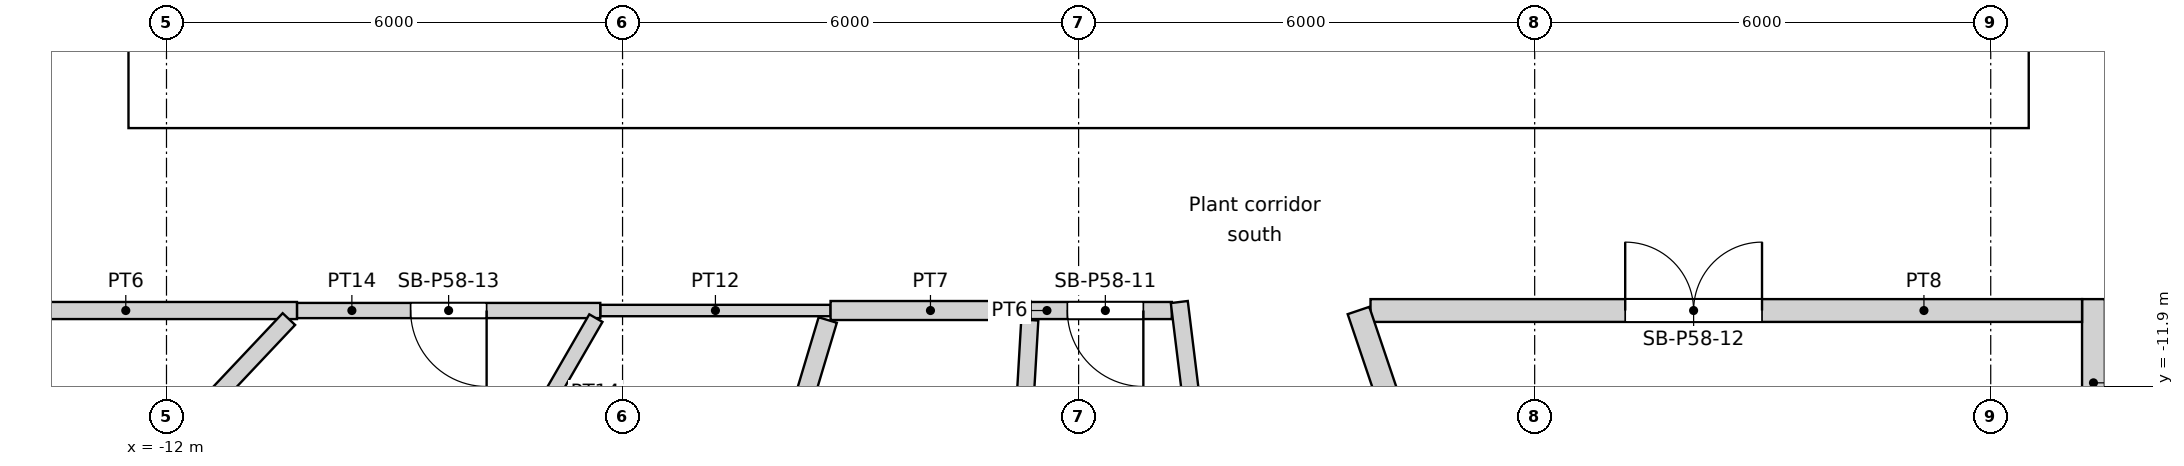
"""IFC4 building model, lengths in metres.
Left out: names, types, materials, properties, quantities, classifications, styles, units other than length and angle.
Written with IfcOpenShell. Run it as: python <this file> out.ifc"""

import sys

from ifc_helpers import new_model, si_unit, direction, frame, frame_2d, origin, place, context, subcontext, project, spatial, rectangle, extrude, element, fill, save


model = new_model("IFC4")
c1 = context("Model", 3, precision=1e-05, world=origin(), true_north=direction((0.0, 1.0)))
c2 = subcontext(c1, "Body", "Model", "MODEL_VIEW")
j1 = project(units=[si_unit("LENGTHUNIT", "METRE"), si_unit("PLANEANGLEUNIT", "RADIAN")], contexts=[c1])
p1 = place(None, origin())
s1 = spatial("IfcSite", under=j1, at=p1, CompositionType="ELEMENT")
p2 = place(p1, origin())
s2 = spatial("IfcBuilding", under=s1, at=p2, CompositionType="ELEMENT")
p3 = place(p2, frame((0.0, 0.0, 225.0)))
s3 = spatial("IfcBuildingStorey", under=s2, at=p3, CompositionType="ELEMENT", Elevation=225.0)
p4 = place(p3, frame((-12.5, -8.05, 0.0), z_axis=(0.0, 0.0, 1.0), x_axis=(1.0, 0.0, 0.0)))
e1 = element("IfcWall", 1, at=p4, inside=s3, PredefinedType="SOLIDWALL", context=c2, shape_type="SweptSolid", body=[
    extrude(rectangle(XDim=25.0, YDim=0.9, at=frame_2d((12.5, 0.0))), origin(), (0.0, 0.0, 1.0), 5.65),
])
p5 = place(p4, frame((13.4, 0.0, 0.0)))
e2 = element("IfcOpeningElement", 2, at=p5, cuts=e1, PredefinedType="OPENING", context=c2, shape_type="SweptSolid", body=[
    extrude(rectangle(XDim=1.0, YDim=2.1, at=frame_2d((0.5, 1.05))), frame((0.0, 0.45, 0.0), z_axis=(0.0, -1.0, 0.0), x_axis=(1.0, 0.0, 0.0)), (0.0, 0.0, 1.0), 0.9),
])
p6 = place(p4, frame((8.3, 0.0, 0.0)))
e3 = element("IfcOpeningElement", 3, at=p6, cuts=e1, PredefinedType="OPENING", context=c2, shape_type="SweptSolid", body=[
    extrude(rectangle(XDim=1.8, YDim=2.1, at=frame_2d((0.9, 1.05))), frame((0.0, 0.45, 0.0), z_axis=(0.0, -1.0, 0.0), x_axis=(1.0, 0.0, 0.0)), (0.0, 0.0, 1.0), 0.9),
])
p7 = place(p4, frame((14.9, 0.0, 0.0)))
e4 = element("IfcOpeningElement", 4, at=p7, cuts=e1, PredefinedType="OPENING", context=c2, shape_type="SweptSolid", body=[
    extrude(rectangle(XDim=1.8, YDim=2.1, at=frame_2d((0.9, 1.05))), frame((0.0, 0.45, 0.0), z_axis=(0.0, -1.0, 0.0), x_axis=(1.0, 0.0, 0.0)), (0.0, 0.0, 1.0), 0.9),
])
p8 = place(p3, frame((-12.05, -7.6, 0.0), z_axis=(0.0, 0.0, 1.0), x_axis=(0.0, 1.0, 0.0)))
e5 = element("IfcWall", 5, at=p8, inside=s3, PredefinedType="SOLIDWALL", context=c2, shape_type="SweptSolid", body=[
    extrude(rectangle(XDim=15.2, YDim=0.9, at=frame_2d((7.6, 0.0))), origin(), (0.0, 0.0, 1.0), 5.65),
])
p9 = place(p8, frame((7.1, 0.0, 0.0)))
e6 = element("IfcOpeningElement", 6, at=p9, cuts=e5, PredefinedType="OPENING", context=c2, shape_type="SweptSolid", body=[
    extrude(rectangle(XDim=1.0, YDim=2.1, at=frame_2d((0.5, 1.05))), frame((0.0, 0.45, 0.0), z_axis=(0.0, -1.0, 0.0), x_axis=(1.0, 0.0, 0.0)), (0.0, 0.0, 1.0), 0.9),
])
p10 = place(p3, frame((12.05, -7.6, 0.0), z_axis=(0.0, 0.0, 1.0), x_axis=(0.0, 1.0, 0.0)))
e7 = element("IfcWall", 7, at=p10, inside=s3, PredefinedType="SOLIDWALL", context=c2, shape_type="SweptSolid", body=[
    extrude(rectangle(XDim=15.2, YDim=0.9, at=frame_2d((7.6, 0.0))), origin(), (0.0, 0.0, 1.0), 5.65),
])
p11 = place(p10, frame((5.1, 0.0, 0.0)))
e8 = element("IfcOpeningElement", 8, at=p11, cuts=e7, PredefinedType="OPENING", context=c2, shape_type="SweptSolid", body=[
    extrude(rectangle(XDim=1.0, YDim=2.1, at=frame_2d((0.5, 1.05))), frame((0.0, 0.45, 0.0), z_axis=(0.0, -1.0, 0.0), x_axis=(1.0, 0.0, 0.0)), (0.0, 0.0, 1.0), 0.9),
])
for number, where, z_axis, x_axis in (
    (9, (0.55, -7.6, 0.0), (0.0, 0.0, 1.0), (0.0, 1.0, 0.0)),
    (10, (2.25, -7.6, 0.0), (0.0, 0.0, 1.0), (0.0, 1.0, 0.0)),
):
    element("IfcWall", number, at=place(p3, frame(where, z_axis=z_axis, x_axis=x_axis)), inside=s3, PredefinedType="SOLIDWALL", context=c2, shape_type="SweptSolid", body=[
        extrude(rectangle(XDim=4.35, YDim=0.3, at=frame_2d((2.175, 0.0))), origin(), (0.0, 0.0, 1.0), 5.65),
    ])
p12 = place(p3, frame((-9.05, -7.15, 0.0), z_axis=(0.0, 0.0, 1.0), x_axis=(1.0, 0.0, 0.0)))
e11 = element("IfcWall", 11, at=p12, inside=s3, PredefinedType="SOLIDWALL", context=c2, shape_type="SweptSolid", body=[
    extrude(rectangle(XDim=4.85, YDim=0.9, at=frame_2d((2.425, 0.0))), origin(), (0.0, 0.0, 1.0), 5.65),
])
p13 = place(p3, frame((-2.4, -7.15, 0.0), z_axis=(0.0, 0.0, 1.0), x_axis=(1.0, 0.0, 0.0)))
e12 = element("IfcWall", 12, at=p13, inside=s3, PredefinedType="SOLIDWALL", context=c2, shape_type="SweptSolid", body=[
    extrude(rectangle(XDim=2.8, YDim=0.9, at=frame_2d((1.4, 0.0))), origin(), (0.0, 0.0, 1.0), 5.65),
])
p14 = place(p3, frame((4.2, -7.15, 0.0), z_axis=(0.0, 0.0, 1.0), x_axis=(1.0, 0.0, 0.0)))
e13 = element("IfcWall", 13, at=p14, inside=s3, PredefinedType="SOLIDWALL", context=c2, shape_type="SweptSolid", body=[
    extrude(rectangle(XDim=4.85, YDim=0.9, at=frame_2d((2.425, 0.0))), origin(), (0.0, 0.0, 1.0), 5.65),
])
p15 = place(p3, frame((-17.497, -18.546, 0.0), z_axis=(0.0, 0.0, 1.0), x_axis=(0.686253135809, 0.727362793654, 0.0)))
e14 = element("IfcWall", 14, at=p15, inside=s3, PredefinedType="PARTITIONING", context=c2, shape_type="SweptSolid", body=[
    extrude(rectangle(XDim=10.357, YDim=0.225, at=frame_2d((5.179, 0.0))), origin(), (0.0, 0.0, 1.0), 2.7),
])
p16 = place(p3, frame((-14.788, -10.9, 0.0), z_axis=(0.0, 0.0, 1.0), x_axis=(1.0, 0.0, 0.0)))
e15 = element("IfcWall", 15, at=p16, inside=s3, PredefinedType="PARTITIONING", context=c2, shape_type="SweptSolid", body=[
    extrude(rectangle(XDim=4.504, YDim=0.225, at=frame_2d((2.252, 0.0))), origin(), (0.0, 0.0, 1.0), 5.2),
])
p17 = place(p3, frame((-10.284, -10.9, 0.0), z_axis=(0.0, 0.0, 1.0), x_axis=(1.0, 0.0, 0.0)))
e16 = element("IfcWall", 16, at=p17, inside=s3, PredefinedType="PARTITIONING", context=c2, shape_type="SweptSolid", body=[
    extrude(rectangle(XDim=3.99, YDim=0.2, at=frame_2d((1.995, 0.0))), origin(), (0.0, 0.0, 1.0), 5.2),
])
p18 = place(p17, frame((1.495, 0.0, 0.0)))
e17 = element("IfcOpeningElement", 17, at=p18, cuts=e16, PredefinedType="OPENING", context=c2, shape_type="SweptSolid", body=[
    extrude(rectangle(XDim=1.0, YDim=2.1, at=frame_2d((0.5, 1.05))), frame((0.0, 0.1, 0.0), z_axis=(0.0, -1.0, 0.0), x_axis=(1.0, 0.0, 0.0)), (0.0, 0.0, 1.0), 0.2),
])
p19 = place(p3, frame((-6.351, -11.0, 0.0), z_axis=(0.0, 0.0, 1.0), x_axis=(-0.500013765421, -0.866017456169, 0.0)))
e18 = element("IfcWall", 18, at=p19, inside=s3, PredefinedType="PARTITIONING", context=c2, shape_type="SweptSolid", body=[
    extrude(rectangle(XDim=5.658, YDim=0.2, at=frame_2d((2.829, 0.0))), origin(), (0.0, 0.0, 1.0), 5.2),
])
p20 = place(p19, frame((2.334, 0.0, 0.0)))
e19 = element("IfcOpeningElement", 19, at=p20, cuts=e18, PredefinedType="OPENING", context=c2, shape_type="SweptSolid", body=[
    extrude(rectangle(XDim=1.0, YDim=2.1, at=frame_2d((0.5, 1.05))), frame((0.0, 0.1, 0.0), z_axis=(0.0, -1.0, 0.0), x_axis=(1.0, 0.0, 0.0)), (0.0, 0.0, 1.0), 0.2),
])
p21 = place(p3, frame((-6.293, -10.9, 0.0), z_axis=(0.0, 0.0, 1.0), x_axis=(1.0, 0.0, 0.0)))
e20 = element("IfcWall", 20, at=p21, inside=s3, PredefinedType="PARTITIONING", context=c2, shape_type="SweptSolid", body=[
    extrude(rectangle(XDim=3.03, YDim=0.15, at=frame_2d((1.515, 0.0))), origin(), (0.0, 0.0, 1.0), 5.2),
])
p22 = place(p3, frame((-5.266, -17.589, 0.0), z_axis=(0.0, 0.0, 1.0), x_axis=(0.286831354486, 0.957981092759, 0.0)))
e21 = element("IfcWall", 21, at=p22, inside=s3, PredefinedType="PARTITIONING", context=c2, shape_type="SweptSolid", body=[
    extrude(rectangle(XDim=6.852, YDim=0.25, at=frame_2d((3.426, 0.0))), origin(), (0.0, 0.0, 1.0), 5.2),
])
p23 = place(p3, frame((-3.263, -10.9, 0.0), z_axis=(0.0, 0.0, 1.0), x_axis=(1.0, 0.0, 0.0)))
e22 = element("IfcWall", 22, at=p23, inside=s3, PredefinedType="PARTITIONING", context=c2, shape_type="SweptSolid", body=[
    extrude(rectangle(XDim=2.628, YDim=0.25, at=frame_2d((1.314, 0.0))), origin(), (0.0, 0.0, 1.0), 5.2),
])
p24 = place(p3, frame((-1.482, -25.454, 0.0), z_axis=(0.0, 0.0, 1.0), x_axis=(0.058139787004, 0.998308451916, 0.0)))
e23 = element("IfcWall", 23, at=p24, inside=s3, PredefinedType="PARTITIONING", context=c2, shape_type="SweptSolid", body=[
    extrude(rectangle(XDim=14.454, YDim=0.225, at=frame_2d((7.227, 0.0))), origin(), (0.0, 0.0, 1.0), 2.7),
])
p25 = place(p3, frame((-0.635, -10.9, 0.0), z_axis=(0.0, 0.0, 1.0), x_axis=(1.0, 0.0, 0.0)))
e24 = element("IfcWall", 24, at=p25, inside=s3, PredefinedType="PARTITIONING", context=c2, shape_type="SweptSolid", body=[
    extrude(rectangle(XDim=1.861, YDim=0.225, at=frame_2d((0.93, 0.0))), origin(), (0.0, 0.0, 1.0), 5.2),
])
p26 = place(p25, frame((0.487, 0.0, 0.0)))
e25 = element("IfcOpeningElement", 25, at=p26, cuts=e24, PredefinedType="OPENING", context=c2, shape_type="SweptSolid", body=[
    extrude(rectangle(XDim=1.0, YDim=2.1, at=frame_2d((0.5, 1.05))), frame((0.0, 0.113, 0.0), z_axis=(0.0, -1.0, 0.0), x_axis=(1.0, 0.0, 0.0)), (0.0, 0.0, 1.0), 0.225),
])
p27 = place(p3, frame((2.662, -21.679, 0.0), z_axis=(0.0, 0.0, 1.0), x_axis=(-0.121884764191, 0.992544258085, 0.0)))
e26 = element("IfcWall", 26, at=p27, inside=s3, PredefinedType="PARTITIONING", context=c2, shape_type="SweptSolid", body=[
    extrude(rectangle(XDim=10.973, YDim=0.225, at=frame_2d((5.486, 0.0))), origin(), (0.0, 0.0, 1.0), 5.2),
])
p28 = place(p3, frame((3.84, -10.9, 0.0), z_axis=(0.0, 0.0, 1.0), x_axis=(1.0, 0.0, 0.0)))
e27 = element("IfcWall", 27, at=p28, inside=s3, PredefinedType="PARTITIONING", context=c2, shape_type="SweptSolid", body=[
    extrude(rectangle(XDim=9.361, YDim=0.3, at=frame_2d((4.681, 0.0))), origin(), (0.0, 0.0, 1.0), 5.2),
])
p29 = place(p28, frame((3.351, 0.0, 0.0)))
e28 = element("IfcOpeningElement", 28, at=p29, cuts=e27, PredefinedType="OPENING", context=c2, shape_type="SweptSolid", body=[
    extrude(rectangle(XDim=1.8, YDim=2.4, at=frame_2d((0.9, 1.2))), frame((0.0, 0.15, 0.0), z_axis=(0.0, -1.0, 0.0), x_axis=(1.0, 0.0, 0.0)), (0.0, 0.0, 1.0), 0.3),
])
p30 = place(p3, frame((7.076, -20.947, 0.0), z_axis=(0.0, 0.0, 1.0), x_axis=(-0.320044465118, 0.947402522874, 0.0)))
e29 = element("IfcWall", 29, at=p30, inside=s3, PredefinedType="PARTITIONING", context=c2, shape_type="SweptSolid", body=[
    extrude(rectangle(XDim=10.605, YDim=0.3, at=frame_2d((5.302, 0.0))), origin(), (0.0, 0.0, 1.0), 5.2),
])
p31 = place(p3, frame((13.352, -10.75, 0.0), z_axis=(0.0, 0.0, 1.0), x_axis=(0.0, -1.0, 0.0)))
e30 = element("IfcWall", 30, at=p31, inside=s3, PredefinedType="PARTITIONING", context=c2, shape_type="SweptSolid", body=[
    extrude(rectangle(XDim=2.203, YDim=0.3, at=frame_2d((1.102, 0.0))), origin(), (0.0, 0.0, 1.0), 5.2),
])
p32 = place(p5, origin())
e31 = element("IfcDoor", 31, at=p32, inside=s3, OperationType="SINGLE_SWING_LEFT", PredefinedType="DOOR", context=c2, shape_type="SweptSolid", body=[
    extrude(rectangle(XDim=1.0, YDim=2.1, at=frame_2d((0.5, 1.05))), frame((0.0, 0.025, 0.0), z_axis=(0.0, -1.0, 0.0), x_axis=(1.0, 0.0, 0.0)), (0.0, 0.0, 1.0), 0.05),
])
fill(e2, e31)
p33 = place(p6, origin())
e32 = element("IfcDoor", 32, at=p33, inside=s3, OperationType="DOUBLE_DOOR_SINGLE_SWING", PredefinedType="DOOR", context=c2, shape_type="SweptSolid", body=[
    extrude(rectangle(XDim=1.8, YDim=2.1, at=frame_2d((0.9, 1.05))), frame((0.0, 0.025, 0.0), z_axis=(0.0, -1.0, 0.0), x_axis=(1.0, 0.0, 0.0)), (0.0, 0.0, 1.0), 0.05),
])
fill(e3, e32)
p34 = place(p7, origin())
e33 = element("IfcDoor", 33, at=p34, inside=s3, OperationType="DOUBLE_DOOR_SINGLE_SWING", PredefinedType="DOOR", context=c2, shape_type="SweptSolid", body=[
    extrude(rectangle(XDim=1.8, YDim=2.1, at=frame_2d((0.9, 1.05))), frame((0.0, 0.025, 0.0), z_axis=(0.0, -1.0, 0.0), x_axis=(1.0, 0.0, 0.0)), (0.0, 0.0, 1.0), 0.05),
])
fill(e4, e33)
p35 = place(p26, origin())
e34 = element("IfcDoor", 34, at=p35, inside=s3, OperationType="SINGLE_SWING_LEFT", PredefinedType="DOOR", context=c2, shape_type="SweptSolid", body=[
    extrude(rectangle(XDim=1.0, YDim=2.1, at=frame_2d((0.5, 1.05))), frame((0.0, 0.025, 0.0), z_axis=(0.0, -1.0, 0.0), x_axis=(1.0, 0.0, 0.0)), (0.0, 0.0, 1.0), 0.05),
])
fill(e25, e34)
p36 = place(p29, origin())
e35 = element("IfcDoor", 35, at=p36, inside=s3, OperationType="DOUBLE_DOOR_SINGLE_SWING", PredefinedType="DOOR", context=c2, shape_type="SweptSolid", body=[
    extrude(rectangle(XDim=1.8, YDim=2.4, at=frame_2d((0.9, 1.2))), frame((0.0, 0.025, 0.0), z_axis=(0.0, -1.0, 0.0), x_axis=(1.0, 0.0, 0.0)), (0.0, 0.0, 1.0), 0.05),
])
fill(e28, e35)
p37 = place(p18, origin())
e36 = element("IfcDoor", 36, at=p37, inside=s3, OperationType="SINGLE_SWING_LEFT", PredefinedType="DOOR", context=c2, shape_type="SweptSolid", body=[
    extrude(rectangle(XDim=1.0, YDim=2.1, at=frame_2d((0.5, 1.05))), frame((0.0, 0.025, 0.0), z_axis=(0.0, -1.0, 0.0), x_axis=(1.0, 0.0, 0.0)), (0.0, 0.0, 1.0), 0.05),
])
fill(e17, e36)
save(model, sys.argv[1])
